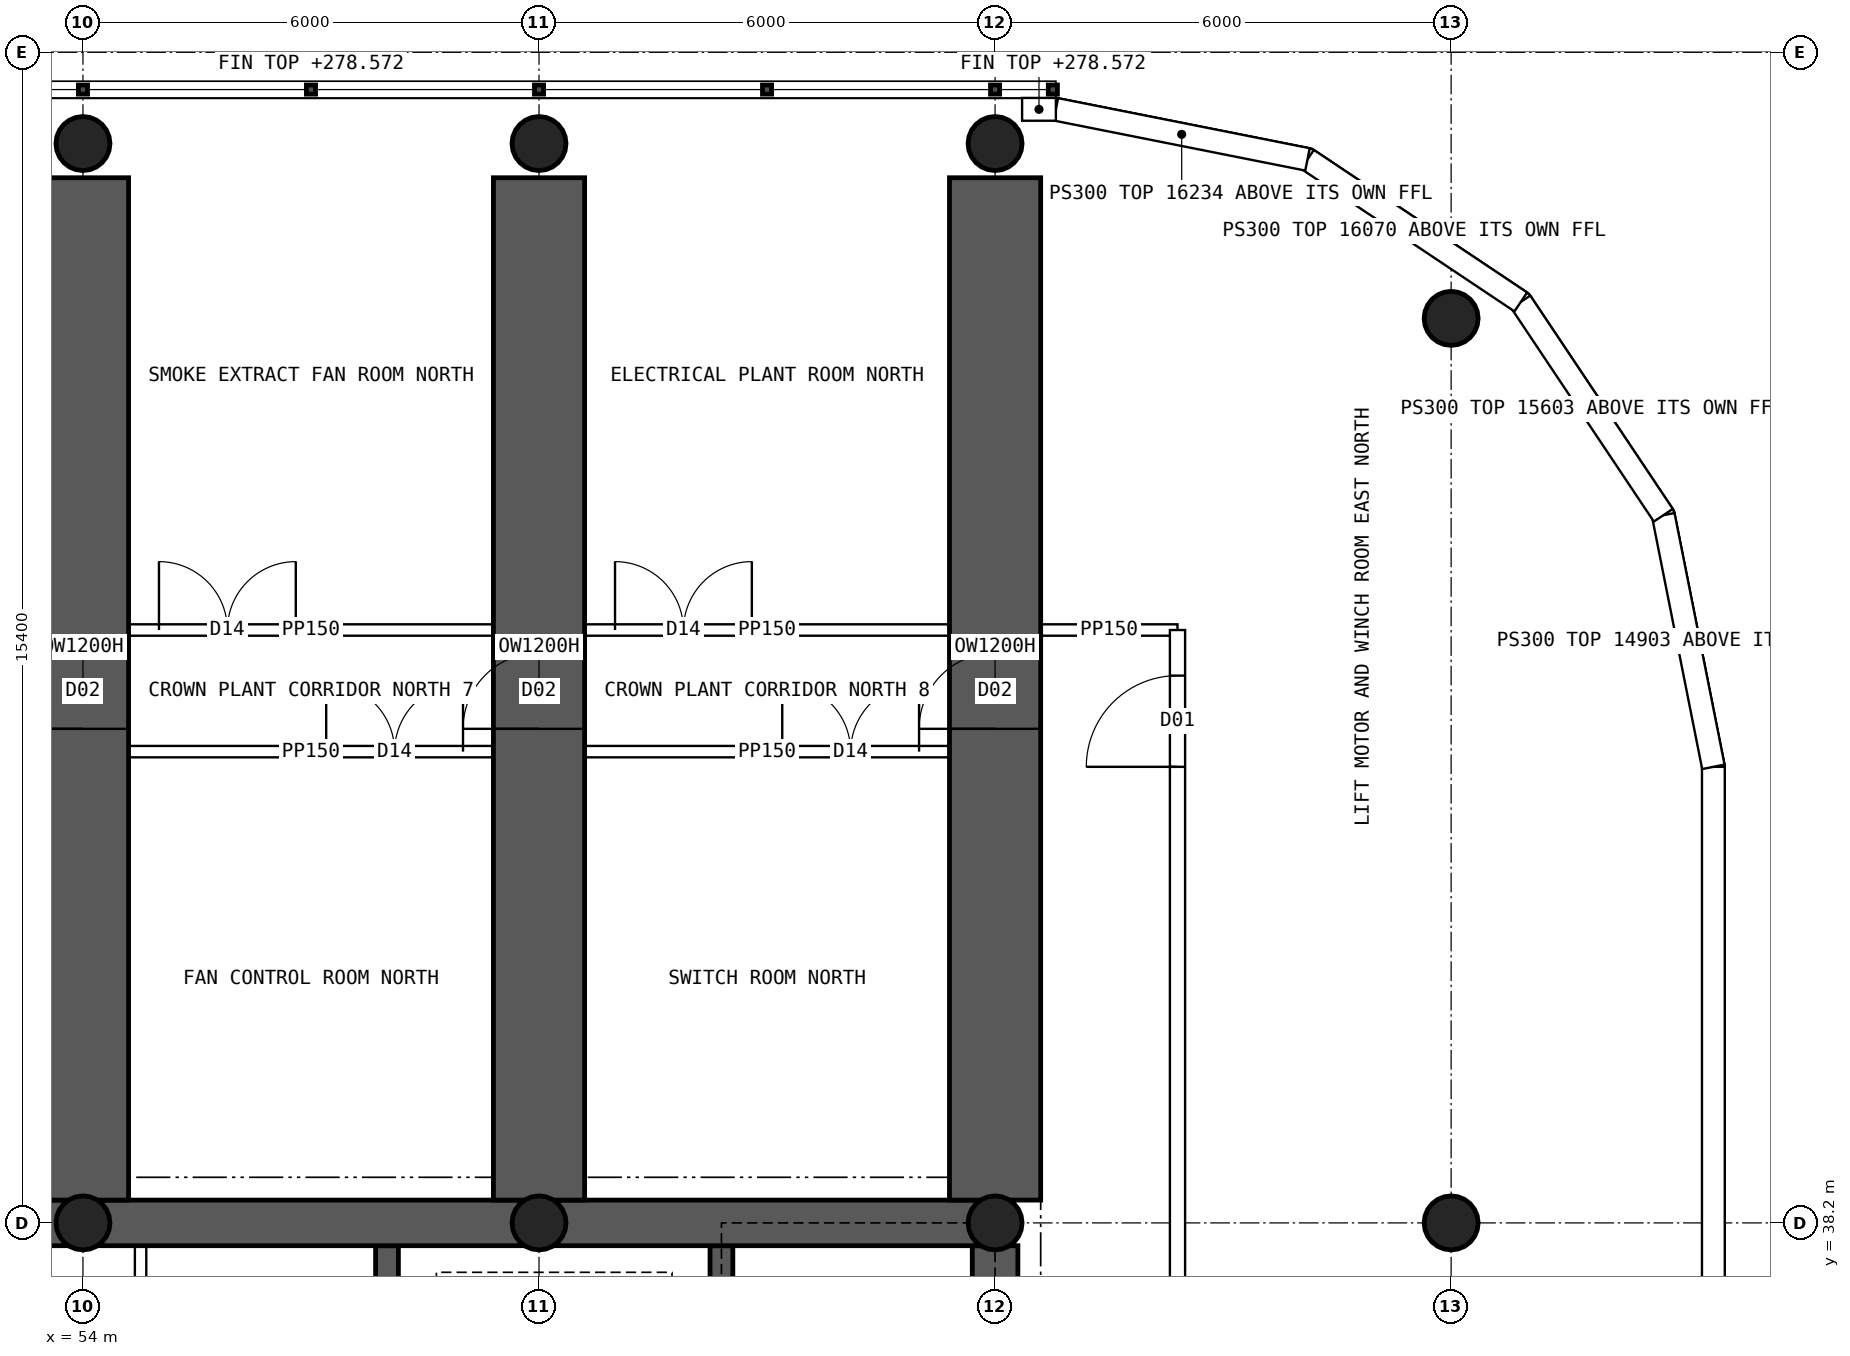
"""IFC4 building model, lengths in metres.
Left out: names, types, materials, properties, quantities, classifications, styles, units other than length and angle.
Written with IfcOpenShell. Run it as: python <this file> out.ifc"""

import sys

from ifc_helpers import new_model, si_unit, direction, frame, frame_2d, origin, origin_2d, place, context, subcontext, project, spatial, polyline, rectangle, hollow_circle, outline, extrude, clip, halfspace, element, fill, save


model = new_model("IFC4")
c1 = context("Model", 3, precision=1e-05, world=origin(), true_north=direction((0.0, 1.0)))
c2 = subcontext(c1, "Body", "Model", "MODEL_VIEW")
j1 = project(units=[si_unit("LENGTHUNIT", "METRE"), si_unit("PLANEANGLEUNIT", "RADIAN")], contexts=[c1])
p1 = place(None, origin())
s1 = spatial("IfcSite", under=j1, at=p1, CompositionType="ELEMENT")
p2 = place(p1, origin())
s2 = spatial("IfcBuilding", under=s1, at=p2, CompositionType="ELEMENT")
p3 = place(p2, frame((0.0, 0.0, 262.3)))
s3 = spatial("IfcBuildingStorey", under=s2, at=p3, CompositionType="ELEMENT", Elevation=262.3)
p4 = place(p3, frame((18.0, 38.2, 0.0), z_axis=(0.0, 0.0, 1.0), x_axis=(1.0, 0.0, 0.0)))
e1 = element("IfcWall", 1, at=p4, inside=s3, PredefinedType="SHEAR", context=c2, shape_type="SweptSolid", body=[
    extrude(rectangle(XDim=48.0, YDim=0.6, at=frame_2d((24.0, 0.0))), origin(), (0.0, 0.0, 1.0), 6.0),
])
p5 = place(p3, frame((66.0, 26.1, 0.0), z_axis=(0.0, 0.0, 1.0), x_axis=(0.0, 1.0, 0.0)))
e2 = element("IfcWall", 2, at=p5, inside=s3, PredefinedType="SHEAR", context=c2, shape_type="SweptSolid", body=[
    extrude(rectangle(XDim=11.8, YDim=0.6, at=frame_2d((5.9, 0.0))), origin(), (0.0, 0.0, 1.0), 6.0),
])
p6 = place(p5, frame((5.2, 0.0, 0.0)))
e3 = element("IfcOpeningElement", 3, at=p6, cuts=e2, PredefinedType="OPENING", context=c2, shape_type="SweptSolid", body=[
    extrude(rectangle(XDim=1.2, YDim=2.1, at=frame_2d((0.6, 1.05))), frame((0.0, 0.31, 0.0), z_axis=(0.0, -1.0, 0.0), x_axis=(1.0, 0.0, 0.0)), (0.0, 0.0, 1.0), 0.62),
])
for number, where, z_axis, x_axis in (
    (4, (62.4, 34.75, 0.0), (0.0, 0.0, 1.0), (0.0, 1.0, 0.0)),
    (5, (58.0, 34.75, 0.0), (0.0, 0.0, 1.0), (0.0, 1.0, 0.0)),
):
    element("IfcWall", number, at=place(p3, frame(where, z_axis=z_axis, x_axis=x_axis)), inside=s3, PredefinedType="SHEAR", context=c2, shape_type="SweptSolid", body=[
        extrude(rectangle(XDim=3.15, YDim=0.3, at=frame_2d((1.575, 0.0))), origin(), (0.0, 0.0, 1.0), 6.0),
    ])
p7 = place(p3, frame((54.0, 38.5, 0.0), z_axis=(0.0, 0.0, 1.0), x_axis=(0.0, 1.0, 0.0)))
e6 = element("IfcWall", 6, at=p7, inside=s3, PredefinedType="SHEAR", context=c2, shape_type="SweptSolid", body=[
    extrude(rectangle(XDim=13.45, YDim=1.2, at=frame_2d((6.725, 0.0))), origin(), (0.0, 0.0, 1.0), 4.4),
])
p8 = place(p7, frame((6.2, 0.0, 0.0)))
e7 = element("IfcOpeningElement", 7, at=p8, cuts=e6, PredefinedType="OPENING", context=c2, shape_type="SweptSolid", body=[
    extrude(rectangle(XDim=1.0, YDim=2.1, at=frame_2d((0.5, 1.05))), frame((0.0, 0.61, 0.0), z_axis=(0.0, -1.0, 0.0), x_axis=(1.0, 0.0, 0.0)), (0.0, 0.0, 1.0), 1.22),
])
p9 = place(p3, frame((60.0, 38.5, 0.0), z_axis=(0.0, 0.0, 1.0), x_axis=(0.0, 1.0, 0.0)))
e8 = element("IfcWall", 8, at=p9, inside=s3, PredefinedType="SHEAR", context=c2, shape_type="SweptSolid", body=[
    extrude(rectangle(XDim=13.45, YDim=1.2, at=frame_2d((6.725, 0.0))), origin(), (0.0, 0.0, 1.0), 4.4),
])
p10 = place(p9, frame((6.2, 0.0, 0.0)))
e9 = element("IfcOpeningElement", 9, at=p10, cuts=e8, PredefinedType="OPENING", context=c2, shape_type="SweptSolid", body=[
    extrude(rectangle(XDim=1.0, YDim=2.1, at=frame_2d((0.5, 1.05))), frame((0.0, 0.61, 0.0), z_axis=(0.0, -1.0, 0.0), x_axis=(1.0, 0.0, 0.0)), (0.0, 0.0, 1.0), 1.22),
])
p11 = place(p3, frame((66.0, 38.5, 0.0), z_axis=(0.0, 0.0, 1.0), x_axis=(0.0, 1.0, 0.0)))
e10 = element("IfcWall", 10, at=p11, inside=s3, PredefinedType="SHEAR", context=c2, shape_type="SweptSolid", body=[
    extrude(rectangle(XDim=13.45, YDim=1.2, at=frame_2d((6.725, 0.0))), origin(), (0.0, 0.0, 1.0), 4.4),
])
p12 = place(p11, frame((6.2, 0.0, 0.0)))
e11 = element("IfcOpeningElement", 11, at=p12, cuts=e10, PredefinedType="OPENING", context=c2, shape_type="SweptSolid", body=[
    extrude(rectangle(XDim=1.0, YDim=2.1, at=frame_2d((0.5, 1.05))), frame((0.0, 0.61, 0.0), z_axis=(0.0, -1.0, 0.0), x_axis=(1.0, 0.0, 0.0)), (0.0, 0.0, 1.0), 1.22),
])
p13 = place(p3, frame((54.0, 38.2, 0.0), z_axis=(0.0, 0.0, 1.0), x_axis=(1.0, 0.0, 0.0)))
e12 = element("IfcColumn", 12, at=p13, inside=s3, PredefinedType="COLUMN", context=c2, shape_type="SweptSolid", body=[
    extrude(hollow_circle(Radius=0.355, WallThickness=0.025, at=origin_2d()), origin(), (0.0, 0.0, 1.0), 11.517),
])
p14 = place(p3, frame((54.0, 52.4, 0.0), z_axis=(0.0, 0.0, 1.0), x_axis=(1.0, 0.0, 0.0)))
e13 = element("IfcColumn", 13, at=p14, inside=s3, PredefinedType="COLUMN", context=c2, shape_type="SweptSolid", body=[
    extrude(hollow_circle(Radius=0.355, WallThickness=0.025, at=origin_2d()), origin(), (0.0, 0.0, 1.0), 15.058),
])
p15 = place(p3, frame((60.0, 38.2, 0.0), z_axis=(0.0, 0.0, 1.0), x_axis=(1.0, 0.0, 0.0)))
e14 = element("IfcColumn", 14, at=p15, inside=s3, PredefinedType="COLUMN", context=c2, shape_type="SweptSolid", body=[
    extrude(hollow_circle(Radius=0.355, WallThickness=0.025, at=origin_2d()), origin(), (0.0, 0.0, 1.0), 11.517),
])
p16 = place(p3, frame((60.0, 52.4, 0.0), z_axis=(0.0, 0.0, 1.0), x_axis=(1.0, 0.0, 0.0)))
e15 = element("IfcColumn", 15, at=p16, inside=s3, PredefinedType="COLUMN", context=c2, shape_type="SweptSolid", body=[
    extrude(hollow_circle(Radius=0.355, WallThickness=0.025, at=origin_2d()), origin(), (0.0, 0.0, 1.0), 15.058),
])
p17 = place(p3, frame((66.0, 38.2, 0.0), z_axis=(0.0, 0.0, 1.0), x_axis=(1.0, 0.0, 0.0)))
e16 = element("IfcColumn", 16, at=p17, inside=s3, PredefinedType="COLUMN", context=c2, shape_type="SweptSolid", body=[
    extrude(hollow_circle(Radius=0.355, WallThickness=0.025, at=origin_2d()), origin(), (0.0, 0.0, 1.0), 11.517),
])
p18 = place(p3, frame((66.0, 52.4, 0.0), z_axis=(0.0, 0.0, 1.0), x_axis=(1.0, 0.0, 0.0)))
e17 = element("IfcColumn", 17, at=p18, inside=s3, PredefinedType="COLUMN", context=c2, shape_type="SweptSolid", body=[
    extrude(hollow_circle(Radius=0.355, WallThickness=0.025, at=origin_2d()), origin(), (0.0, 0.0, 1.0), 15.058),
])
p19 = place(p3, frame((72.0, 38.2, 0.0), z_axis=(0.0, 0.0, 1.0), x_axis=(1.0, 0.0, 0.0)))
e18 = element("IfcColumn", 18, at=p19, inside=s3, PredefinedType="COLUMN", context=c2, shape_type="SweptSolid", body=[
    extrude(hollow_circle(Radius=0.355, WallThickness=0.025, at=origin_2d()), origin(), (0.0, 0.0, 1.0), 11.524),
])
p20 = place(p3, frame((72.0, 50.1, 0.0), z_axis=(0.0, 0.0, 1.0), x_axis=(1.0, 0.0, 0.0)))
e19 = element("IfcColumn", 19, at=p20, inside=s3, PredefinedType="COLUMN", context=c2, shape_type="SweptSolid", body=[
    extrude(hollow_circle(Radius=0.355, WallThickness=0.025, at=origin_2d()), origin(), (0.0, 0.0, 1.0), 14.491),
])
p21 = place(p3, frame((75.45, 19.8, 0.0), z_axis=(0.0, 0.0, 1.0), x_axis=(0.0, 1.0, 0.0)))
e20 = element("IfcWall", 20, at=p21, inside=s3, PredefinedType="SOLIDWALL", context=c2, shape_type="Clipping", body=[
    clip(clip(extrude(outline(polyline([(-0.025, 0.0), (24.425, 0.0), (24.425, 14.084), (-0.025, 7.988), (-0.025, 0.0)])), frame((0.0, 0.15, 0.0), z_axis=(0.0, -1.0, 0.0), x_axis=(1.0, 0.0, 0.0)), (0.0, 0.0, 1.0), 0.3), halfspace(frame((0.0, 0.0, 0.0), z_axis=(-0.995184726707, 0.098017139978, 0.0)), False)), halfspace(frame((24.4, 0.0, 0.0), z_axis=(0.995184726707, 0.098017139978, 0.0)), False)),
])
p22 = place(p3, frame((75.45, 44.2, 0.0), z_axis=(0.0, 0.0, 1.0), x_axis=(-0.19508664885, 0.980786011034, 0.0)))
e21 = element("IfcWall", 21, at=p22, inside=s3, PredefinedType="SOLIDWALL", context=c2, shape_type="Clipping", body=[
    clip(clip(extrude(outline(polyline([(-0.04, 0.0), (3.415, 0.0), (3.415, 14.913), (3.375, 14.903), (-0.04, 14.068), (-0.04, 0.0)])), frame((0.0, 0.15, 0.0), z_axis=(0.0, -1.0, 0.0), x_axis=(1.0, 0.0, 0.0)), (0.0, 0.0, 1.0), 0.3), halfspace(frame((0.0, 0.0, 0.0), z_axis=(-0.995184765828, 0.098016742771, 0.0)), False)), halfspace(frame((3.375, 0.0, 0.0), z_axis=(0.980785349348, 0.195089975409, 0.0)), False)),
])
p23 = place(p3, frame((74.792, 47.51, 0.0), z_axis=(0.0, 0.0, 1.0), x_axis=(-0.555567969291, 0.831471124873, 0.0)))
e22 = element("IfcWall", 22, at=p23, inside=s3, PredefinedType="SOLIDWALL", context=c2, shape_type="Clipping", body=[
    clip(clip(extrude(outline(polyline([(-0.04, 0.0), (3.415, 0.0), (3.415, 15.611), (-0.04, 14.895), (-0.04, 0.0)])), frame((0.0, 0.15, 0.0), z_axis=(0.0, -1.0, 0.0), x_axis=(1.0, 0.0, 0.0)), (0.0, 0.0, 1.0), 0.3), halfspace(frame((0.0, 0.0, 0.0), z_axis=(-0.980785349348, 0.195089975409, 0.0)), False)), halfspace(frame((3.375, 0.0, 0.0), z_axis=(0.980785349348, 0.195089975409, 0.0)), False)),
])
p24 = place(p3, frame((72.917, 50.316, 0.0), z_axis=(0.0, 0.0, 1.0), x_axis=(-0.831460037396, 0.555584562613, 0.0)))
e23 = element("IfcWall", 23, at=p24, inside=s3, PredefinedType="SOLIDWALL", context=c2, shape_type="Clipping", body=[
    clip(clip(extrude(outline(polyline([(-0.04, 0.0), (3.415, 0.0), (3.415, 16.076), (3.375, 16.07), (-0.04, 15.597), (-0.04, 0.0)])), frame((0.0, 0.15, 0.0), z_axis=(0.0, -1.0, 0.0), x_axis=(1.0, 0.0, 0.0)), (0.0, 0.0, 1.0), 0.3), halfspace(frame((0.0, 0.0, 0.0), z_axis=(-0.980785349348, 0.195089975409, 0.0)), False)), halfspace(frame((3.375, 0.0, 0.0), z_axis=(0.980785349348, 0.195089975409, 0.0)), False)),
])
p25 = place(p3, frame((70.11, 52.192, 0.0), z_axis=(0.0, 0.0, 1.0), x_axis=(-0.98078325777, 0.195100490205, 0.0)))
e24 = element("IfcWall", 24, at=p25, inside=s3, PredefinedType="SOLIDWALL", context=c2, shape_type="Clipping", body=[
    clip(clip(extrude(outline(polyline([(-0.04, 0.0), (3.415, 0.0), (3.415, 16.236), (-0.04, 16.068), (-0.04, 0.0)])), frame((0.0, 0.15, 0.0), z_axis=(0.0, -1.0, 0.0), x_axis=(1.0, 0.0, 0.0)), (0.0, 0.0, 1.0), 0.3), halfspace(frame((0.0, 0.0, 0.0), z_axis=(-0.980785349348, 0.195089975409, 0.0)), False)), halfspace(frame((3.375, 0.0, 0.0), z_axis=(0.980785349348, 0.195089975409, 0.0)), False)),
])
p26 = place(p3, frame((66.8, 52.85, 0.0), z_axis=(0.0, 0.0, 1.0), x_axis=(-1.0, 0.0, 0.0)))
e25 = element("IfcWall", 25, at=p26, inside=s3, PredefinedType="SOLIDWALL", context=c2, shape_type="SweptSolid", body=[
    extrude(outline(polyline([(0.0, 0.0), (0.445, 0.0), (0.445, 16.234), (0.0, 16.234), (0.0, 0.0)])), frame((0.0, 0.15, 0.0), z_axis=(0.0, -1.0, 0.0), x_axis=(1.0, 0.0, 0.0)), (0.0, 0.0, 1.0), 0.3),
])
p27 = place(p3, frame((54.758, 34.75, 0.0), z_axis=(0.0, 0.0, 1.0), x_axis=(0.0, 1.0, 0.0)))
e26 = element("IfcWall", 26, at=p27, inside=s3, PredefinedType="SOLIDWALL", context=c2, shape_type="SweptSolid", body=[
    extrude(rectangle(XDim=3.15, YDim=0.15, at=frame_2d((1.575, 0.0))), origin(), (0.0, 0.0, 1.0), 6.0),
])
p28 = place(p3, frame((68.4, 18.0, 0.0), z_axis=(0.0, 0.0, 1.0), x_axis=(0.0, 1.0, 0.0)))
e27 = element("IfcWall", 27, at=p28, inside=s3, PredefinedType="SOLIDWALL", context=c2, shape_type="SweptSolid", body=[
    extrude(rectangle(XDim=28.0, YDim=0.2, at=frame_2d((14.0, 0.0))), origin(), (0.0, 0.0, 1.0), 6.0),
])
p29 = place(p28, frame((13.1, 0.0, 0.0)))
e28 = element("IfcOpeningElement", 28, at=p29, cuts=e27, PredefinedType="OPENING", context=c2, shape_type="SweptSolid", body=[
    extrude(rectangle(XDim=1.8, YDim=2.1, at=frame_2d((0.9, 1.05))), frame((0.0, 0.11, 0.0), z_axis=(0.0, -1.0, 0.0), x_axis=(1.0, 0.0, 0.0)), (0.0, 0.0, 1.0), 0.22),
])
p30 = place(p28, frame((26.2, 0.0, 0.0)))
e29 = element("IfcOpeningElement", 29, at=p30, cuts=e27, PredefinedType="OPENING", context=c2, shape_type="SweptSolid", body=[
    extrude(rectangle(XDim=1.2, YDim=2.1, at=frame_2d((0.6, 1.05))), frame((0.0, 0.11, 0.0), z_axis=(0.0, -1.0, 0.0), x_axis=(1.0, 0.0, 0.0)), (0.0, 0.0, 1.0), 0.22),
])
p31 = place(p28, frame((0.6, 0.0, 0.0)))
e30 = element("IfcOpeningElement", 30, at=p31, cuts=e27, PredefinedType="OPENING", context=c2, shape_type="SweptSolid", body=[
    extrude(rectangle(XDim=1.2, YDim=2.1, at=frame_2d((0.6, 1.05))), frame((0.0, 0.11, 0.0), z_axis=(0.0, -1.0, 0.0), x_axis=(1.0, 0.0, 0.0)), (0.0, 0.0, 1.0), 0.22),
])
p32 = place(p3, frame((66.6, 46.0, 0.0), z_axis=(0.0, 0.0, 1.0), x_axis=(1.0, 0.0, 0.0)))
e31 = element("IfcWall", 31, at=p32, inside=s3, PredefinedType="PARTITIONING", context=c2, shape_type="SweptSolid", body=[
    extrude(rectangle(XDim=1.8, YDim=0.15, at=frame_2d((0.9, 0.0))), origin(), (0.0, 0.0, 1.0), 6.0),
])
p33 = place(p3, frame((54.6, 46.0, 0.0), z_axis=(0.0, 0.0, 1.0), x_axis=(1.0, 0.0, 0.0)))
e32 = element("IfcWall", 32, at=p33, inside=s3, PredefinedType="PARTITIONING", context=c2, shape_type="SweptSolid", body=[
    extrude(rectangle(XDim=4.8, YDim=0.15, at=frame_2d((2.4, 0.0))), origin(), (0.0, 0.0, 1.0), 6.0),
])
p34 = place(p33, frame((0.4, 0.0, 0.0)))
e33 = element("IfcOpeningElement", 33, at=p34, cuts=e32, PredefinedType="OPENING", context=c2, shape_type="SweptSolid", body=[
    extrude(rectangle(XDim=1.8, YDim=2.4, at=frame_2d((0.9, 1.2))), frame((0.0, 0.085, 0.0), z_axis=(0.0, -1.0, 0.0), x_axis=(1.0, 0.0, 0.0)), (0.0, 0.0, 1.0), 0.17),
])
p35 = place(p3, frame((54.6, 44.4, 0.0), z_axis=(0.0, 0.0, 1.0), x_axis=(1.0, 0.0, 0.0)))
e34 = element("IfcWall", 34, at=p35, inside=s3, PredefinedType="PARTITIONING", context=c2, shape_type="SweptSolid", body=[
    extrude(rectangle(XDim=4.8, YDim=0.15, at=frame_2d((2.4, 0.0))), origin(), (0.0, 0.0, 1.0), 6.0),
])
p36 = place(p35, frame((2.6, 0.0, 0.0)))
e35 = element("IfcOpeningElement", 35, at=p36, cuts=e34, PredefinedType="OPENING", context=c2, shape_type="SweptSolid", body=[
    extrude(rectangle(XDim=1.8, YDim=2.4, at=frame_2d((0.9, 1.2))), frame((0.0, 0.085, 0.0), z_axis=(0.0, -1.0, 0.0), x_axis=(1.0, 0.0, 0.0)), (0.0, 0.0, 1.0), 0.17),
])
p37 = place(p3, frame((60.6, 46.0, 0.0), z_axis=(0.0, 0.0, 1.0), x_axis=(1.0, 0.0, 0.0)))
e36 = element("IfcWall", 36, at=p37, inside=s3, PredefinedType="PARTITIONING", context=c2, shape_type="SweptSolid", body=[
    extrude(rectangle(XDim=4.8, YDim=0.15, at=frame_2d((2.4, 0.0))), origin(), (0.0, 0.0, 1.0), 6.0),
])
p38 = place(p37, frame((0.4, 0.0, 0.0)))
e37 = element("IfcOpeningElement", 37, at=p38, cuts=e36, PredefinedType="OPENING", context=c2, shape_type="SweptSolid", body=[
    extrude(rectangle(XDim=1.8, YDim=2.4, at=frame_2d((0.9, 1.2))), frame((0.0, 0.085, 0.0), z_axis=(0.0, -1.0, 0.0), x_axis=(1.0, 0.0, 0.0)), (0.0, 0.0, 1.0), 0.17),
])
p39 = place(p3, frame((60.6, 44.4, 0.0), z_axis=(0.0, 0.0, 1.0), x_axis=(1.0, 0.0, 0.0)))
e38 = element("IfcWall", 38, at=p39, inside=s3, PredefinedType="PARTITIONING", context=c2, shape_type="SweptSolid", body=[
    extrude(rectangle(XDim=4.8, YDim=0.15, at=frame_2d((2.4, 0.0))), origin(), (0.0, 0.0, 1.0), 6.0),
])
p40 = place(p39, frame((2.6, 0.0, 0.0)))
e39 = element("IfcOpeningElement", 39, at=p40, cuts=e38, PredefinedType="OPENING", context=c2, shape_type="SweptSolid", body=[
    extrude(rectangle(XDim=1.8, YDim=2.4, at=frame_2d((0.9, 1.2))), frame((0.0, 0.085, 0.0), z_axis=(0.0, -1.0, 0.0), x_axis=(1.0, 0.0, 0.0)), (0.0, 0.0, 1.0), 0.17),
])
p41 = place(p30, origin())
e40 = element("IfcDoor", 40, at=p41, inside=s3, OperationType="SINGLE_SWING_LEFT", PredefinedType="DOOR", context=c2, shape_type="SweptSolid", body=[
    extrude(rectangle(XDim=1.2, YDim=2.1, at=frame_2d((0.6, 1.05))), frame((0.0, 0.025, 0.0), z_axis=(0.0, -1.0, 0.0), x_axis=(1.0, 0.0, 0.0)), (0.0, 0.0, 1.0), 0.05),
])
fill(e29, e40)
p42 = place(p8, origin())
e41 = element("IfcDoor", 41, at=p42, inside=s3, OperationType="SINGLE_SWING_LEFT", PredefinedType="DOOR", context=c2, shape_type="SweptSolid", body=[
    extrude(rectangle(XDim=1.0, YDim=2.1, at=frame_2d((0.5, 1.05))), frame((0.0, 0.025, 0.0), z_axis=(0.0, -1.0, 0.0), x_axis=(1.0, 0.0, 0.0)), (0.0, 0.0, 1.0), 0.05),
])
fill(e7, e41)
p43 = place(p10, origin())
e42 = element("IfcDoor", 42, at=p43, inside=s3, OperationType="SINGLE_SWING_LEFT", PredefinedType="DOOR", context=c2, shape_type="SweptSolid", body=[
    extrude(rectangle(XDim=1.0, YDim=2.1, at=frame_2d((0.5, 1.05))), frame((0.0, 0.025, 0.0), z_axis=(0.0, -1.0, 0.0), x_axis=(1.0, 0.0, 0.0)), (0.0, 0.0, 1.0), 0.05),
])
fill(e9, e42)
p44 = place(p12, origin())
e43 = element("IfcDoor", 43, at=p44, inside=s3, OperationType="SINGLE_SWING_LEFT", PredefinedType="DOOR", context=c2, shape_type="SweptSolid", body=[
    extrude(rectangle(XDim=1.0, YDim=2.1, at=frame_2d((0.5, 1.05))), frame((0.0, 0.025, 0.0), z_axis=(0.0, -1.0, 0.0), x_axis=(1.0, 0.0, 0.0)), (0.0, 0.0, 1.0), 0.05),
])
fill(e11, e43)
p45 = place(p34, origin())
e44 = element("IfcDoor", 44, at=p45, inside=s3, OperationType="DOUBLE_DOOR_SINGLE_SWING", PredefinedType="DOOR", context=c2, shape_type="SweptSolid", body=[
    extrude(rectangle(XDim=1.8, YDim=2.4, at=frame_2d((0.9, 1.2))), frame((0.0, 0.025, 0.0), z_axis=(0.0, -1.0, 0.0), x_axis=(1.0, 0.0, 0.0)), (0.0, 0.0, 1.0), 0.05),
])
fill(e33, e44)
p46 = place(p36, origin())
e45 = element("IfcDoor", 45, at=p46, inside=s3, OperationType="DOUBLE_DOOR_SINGLE_SWING", PredefinedType="DOOR", context=c2, shape_type="SweptSolid", body=[
    extrude(rectangle(XDim=1.8, YDim=2.4, at=frame_2d((0.9, 1.2))), frame((0.0, 0.025, 0.0), z_axis=(0.0, -1.0, 0.0), x_axis=(1.0, 0.0, 0.0)), (0.0, 0.0, 1.0), 0.05),
])
fill(e35, e45)
p47 = place(p38, origin())
e46 = element("IfcDoor", 46, at=p47, inside=s3, OperationType="DOUBLE_DOOR_SINGLE_SWING", PredefinedType="DOOR", context=c2, shape_type="SweptSolid", body=[
    extrude(rectangle(XDim=1.8, YDim=2.4, at=frame_2d((0.9, 1.2))), frame((0.0, 0.025, 0.0), z_axis=(0.0, -1.0, 0.0), x_axis=(1.0, 0.0, 0.0)), (0.0, 0.0, 1.0), 0.05),
])
fill(e37, e46)
p48 = place(p40, origin())
e47 = element("IfcDoor", 47, at=p48, inside=s3, OperationType="DOUBLE_DOOR_SINGLE_SWING", PredefinedType="DOOR", context=c2, shape_type="SweptSolid", body=[
    extrude(rectangle(XDim=1.8, YDim=2.4, at=frame_2d((0.9, 1.2))), frame((0.0, 0.025, 0.0), z_axis=(0.0, -1.0, 0.0), x_axis=(1.0, 0.0, 0.0)), (0.0, 0.0, 1.0), 0.05),
])
fill(e39, e47)
save(model, sys.argv[1])
